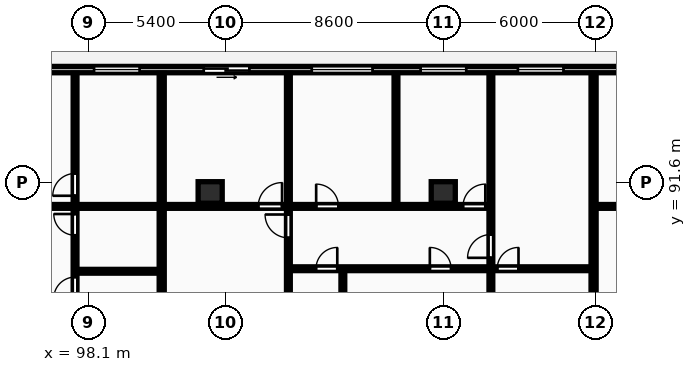
"""IFC4 building model, lengths in metres.
Left out: names, types, materials, properties, quantities, classifications, styles, units other than length and angle.
Written with IfcOpenShell. Run it as: python <this file> out.ifc"""

import sys

from ifc_helpers import new_model, si_unit, direction, frame, frame_2d, origin, origin_2d, place, context, subcontext, project, spatial, rectangle, extrude, element, fill, save


model = new_model("IFC4")
c1 = context("Model", 3, precision=1e-05, world=origin(), true_north=direction((0.0, 1.0)))
c2 = subcontext(c1, "Body", "Model", "MODEL_VIEW")
j1 = project(units=[si_unit("LENGTHUNIT", "METRE"), si_unit("PLANEANGLEUNIT", "RADIAN")], contexts=[c1])
p1 = place(None, origin())
s1 = spatial("IfcSite", under=j1, at=p1, CompositionType="ELEMENT")
p2 = place(p1, origin())
s2 = spatial("IfcBuilding", under=s1, at=p2, CompositionType="ELEMENT")
p3 = place(p2, frame((0.0, 0.0, 87.3)))
s3 = spatial("IfcBuildingStorey", under=s2, at=p3, CompositionType="ELEMENT", Elevation=87.3)
for number, where, z_axis, x_axis in (
    (1, (102.9, 91.2, 0.0), (0.0, 0.0, 1.0), (1.0, 0.0, 0.0)),
    (2, (112.1, 91.2, 0.0), (0.0, 0.0, 1.0), (1.0, 0.0, 0.0)),
):
    element("IfcColumn", number, at=place(p3, frame(where, z_axis=z_axis, x_axis=x_axis)), inside=s3, PredefinedType="COLUMN", context=c2, shape_type="SweptSolid", body=[
        extrude(rectangle(XDim=0.95, YDim=0.85, at=origin_2d()), origin(), (0.0, 0.0, 1.0), 3.25),
    ])
p4 = place(p3, frame((130.6, 96.05, 0.0), z_axis=(0.0, 0.0, 1.0), x_axis=(-1.0, 0.0, 0.0)))
e3 = element("IfcWall", 3, at=p4, inside=s3, PredefinedType="STANDARD", context=c2, shape_type="SweptSolid", body=[
    extrude(rectangle(XDim=73.0, YDim=0.25, at=frame_2d((36.5, 0.0))), origin(), (0.0, 0.0, 1.0), 2.97),
])
p5 = place(p4, frame((67.867, 0.0, 0.0)))
e4 = element("IfcOpeningElement", 4, at=p5, cuts=e3, PredefinedType="OPENING", context=c2, shape_type="SweptSolid", body=[
    extrude(rectangle(XDim=1.8, YDim=2.2, at=frame_2d((0.9, 1.1))), frame((0.0, 0.135, 0.0), z_axis=(0.0, -1.0, 0.0), x_axis=(1.0, 0.0, 0.0)), (0.0, 0.0, 1.0), 0.27),
])
p6 = place(p4, frame((62.103, 0.0, 0.85)))
e5 = element("IfcOpeningElement", 5, at=p6, cuts=e3, PredefinedType="OPENING", context=c2, shape_type="SweptSolid", body=[
    extrude(rectangle(XDim=1.8, YDim=1.8, at=frame_2d((0.9, 0.9))), frame((0.0, 0.135, 0.0), z_axis=(0.0, -1.0, 0.0), x_axis=(1.0, 0.0, 0.0)), (0.0, 0.0, 1.0), 0.27),
])
p7 = place(p4, frame((56.196, 0.0, 0.0)))
e6 = element("IfcOpeningElement", 6, at=p7, cuts=e3, PredefinedType="OPENING", context=c2, shape_type="SweptSolid", body=[
    extrude(rectangle(XDim=1.8, YDim=2.2, at=frame_2d((0.9, 1.1))), frame((0.0, 0.135, 0.0), z_axis=(0.0, -1.0, 0.0), x_axis=(1.0, 0.0, 0.0)), (0.0, 0.0, 1.0), 0.27),
])
p8 = place(p4, frame((46.557, 0.0, 0.85)))
e7 = element("IfcOpeningElement", 7, at=p8, cuts=e3, PredefinedType="OPENING", context=c2, shape_type="SweptSolid", body=[
    extrude(rectangle(XDim=2.4, YDim=1.9, at=frame_2d((1.2, 0.95))), frame((0.0, 0.135, 0.0), z_axis=(0.0, -1.0, 0.0), x_axis=(1.0, 0.0, 0.0)), (0.0, 0.0, 1.0), 0.27),
])
p9 = place(p4, frame((36.714, 0.0, 0.0)))
e8 = element("IfcOpeningElement", 8, at=p9, cuts=e3, PredefinedType="OPENING", context=c2, shape_type="SweptSolid", body=[
    extrude(rectangle(XDim=1.8, YDim=2.2, at=frame_2d((0.9, 1.1))), frame((0.0, 0.135, 0.0), z_axis=(0.0, -1.0, 0.0), x_axis=(1.0, 0.0, 0.0)), (0.0, 0.0, 1.0), 0.27),
])
p10 = place(p4, frame((30.483, 0.0, 0.85)))
e9 = element("IfcOpeningElement", 9, at=p10, cuts=e3, PredefinedType="OPENING", context=c2, shape_type="SweptSolid", body=[
    extrude(rectangle(XDim=1.8, YDim=1.8, at=frame_2d((0.9, 0.9))), frame((0.0, 0.135, 0.0), z_axis=(0.0, -1.0, 0.0), x_axis=(1.0, 0.0, 0.0)), (0.0, 0.0, 1.0), 0.27),
])
p11 = place(p4, frame((21.29, 0.0, 0.85)))
e10 = element("IfcOpeningElement", 10, at=p11, cuts=e3, PredefinedType="OPENING", context=c2, shape_type="SweptSolid", body=[
    extrude(rectangle(XDim=2.4, YDim=1.9, at=frame_2d((1.2, 0.95))), frame((0.0, 0.135, 0.0), z_axis=(0.0, -1.0, 0.0), x_axis=(1.0, 0.0, 0.0)), (0.0, 0.0, 1.0), 0.27),
])
p12 = place(p4, frame((17.593, 0.0, 0.85)))
e11 = element("IfcOpeningElement", 11, at=p12, cuts=e3, PredefinedType="OPENING", context=c2, shape_type="SweptSolid", body=[
    extrude(rectangle(XDim=1.8, YDim=1.8, at=frame_2d((0.9, 0.9))), frame((0.0, 0.135, 0.0), z_axis=(0.0, -1.0, 0.0), x_axis=(1.0, 0.0, 0.0)), (0.0, 0.0, 1.0), 0.27),
])
p13 = place(p4, frame((26.153, 0.0, 0.0)))
e12 = element("IfcOpeningElement", 12, at=p13, cuts=e3, PredefinedType="OPENING", context=c2, shape_type="SweptSolid", body=[
    extrude(rectangle(XDim=1.8, YDim=2.2, at=frame_2d((0.9, 1.1))), frame((0.0, 0.135, 0.0), z_axis=(0.0, -1.0, 0.0), x_axis=(1.0, 0.0, 0.0)), (0.0, 0.0, 1.0), 0.27),
])
p14 = place(p4, frame((13.753, 0.0, 0.85)))
e13 = element("IfcOpeningElement", 13, at=p14, cuts=e3, PredefinedType="OPENING", context=c2, shape_type="SweptSolid", body=[
    extrude(rectangle(XDim=1.8, YDim=1.8, at=frame_2d((0.9, 0.9))), frame((0.0, 0.135, 0.0), z_axis=(0.0, -1.0, 0.0), x_axis=(1.0, 0.0, 0.0)), (0.0, 0.0, 1.0), 0.27),
])
p15 = place(p4, frame((7.363, 0.0, 0.0)))
e14 = element("IfcOpeningElement", 14, at=p15, cuts=e3, PredefinedType="OPENING", context=c2, shape_type="SweptSolid", body=[
    extrude(rectangle(XDim=1.8, YDim=2.2, at=frame_2d((0.9, 1.1))), frame((0.0, 0.135, 0.0), z_axis=(0.0, -1.0, 0.0), x_axis=(1.0, 0.0, 0.0)), (0.0, 0.0, 1.0), 0.27),
])
p16 = place(p4, frame((0.9, 0.0, 0.85)))
e15 = element("IfcOpeningElement", 15, at=p16, cuts=e3, PredefinedType="OPENING", context=c2, shape_type="SweptSolid", body=[
    extrude(rectangle(XDim=2.4, YDim=1.9, at=frame_2d((1.2, 0.95))), frame((0.0, 0.135, 0.0), z_axis=(0.0, -1.0, 0.0), x_axis=(1.0, 0.0, 0.0)), (0.0, 0.0, 1.0), 0.27),
])
p17 = place(p3, frame((100.987, 69.43, 0.0), z_axis=(0.0, 0.0, 1.0), x_axis=(0.0, 1.0, 0.0)))
e16 = element("IfcWall", 16, at=p17, inside=s3, PredefinedType="PARTITIONING", context=c2, shape_type="SweptSolid", body=[
    extrude(rectangle(XDim=26.47, YDim=0.2, at=frame_2d((13.235, 0.0))), origin(), (0.0, 0.0, 1.0), 2.97),
])
p18 = place(p3, frame((97.627, 88.09, 0.0), z_axis=(0.0, 0.0, 1.0), x_axis=(1.0, 0.0, 0.0)))
e17 = element("IfcWall", 17, at=p18, inside=s3, PredefinedType="PARTITIONING", context=c2, shape_type="SweptSolid", body=[
    extrude(rectangle(XDim=3.28, YDim=0.15, at=frame_2d((1.64, 0.0))), origin(), (0.0, 0.0, 1.0), 2.97),
])
p19 = place(p3, frame((97.567, 85.59, 0.0), z_axis=(0.0, 0.0, 1.0), x_axis=(0.0, 1.0, 0.0)))
e18 = element("IfcWall", 18, at=p19, inside=s3, PredefinedType="PARTITIONING", context=c2, shape_type="SweptSolid", body=[
    extrude(rectangle(XDim=10.31, YDim=0.15, at=frame_2d((5.155, 0.0))), origin(), (0.0, 0.0, 1.0), 2.97),
])
p20 = place(p19, frame((1.43, 0.0, 0.0)))
e19 = element("IfcOpeningElement", 19, at=p20, cuts=e18, PredefinedType="OPENING", context=c2, shape_type="SweptSolid", body=[
    extrude(rectangle(XDim=0.84, YDim=2.04, at=frame_2d((0.42, 1.02))), frame((0.0, 0.085, 0.0), z_axis=(0.0, -1.0, 0.0), x_axis=(1.0, 0.0, 0.0)), (0.0, 0.0, 1.0), 0.17),
])
p21 = place(p19, frame((3.92, 0.0, 0.0)))
e20 = element("IfcOpeningElement", 20, at=p21, cuts=e18, PredefinedType="OPENING", context=c2, shape_type="SweptSolid", body=[
    extrude(rectangle(XDim=0.84, YDim=2.04, at=frame_2d((0.42, 1.02))), frame((0.0, 0.085, 0.0), z_axis=(0.0, -1.0, 0.0), x_axis=(1.0, 0.0, 0.0)), (0.0, 0.0, 1.0), 0.17),
])
p22 = place(p19, frame((5.48, 0.0, 0.0)))
e21 = element("IfcOpeningElement", 21, at=p22, cuts=e18, PredefinedType="OPENING", context=c2, shape_type="SweptSolid", body=[
    extrude(rectangle(XDim=0.88, YDim=2.06, at=frame_2d((0.44, 1.03))), frame((0.0, 0.085, 0.0), z_axis=(0.0, -1.0, 0.0), x_axis=(1.0, 0.0, 0.0)), (0.0, 0.0, 1.0), 0.17),
])
p23 = place(p3, frame((88.365, 90.65, 0.0), z_axis=(0.0, 0.0, 1.0), x_axis=(1.0, 0.0, 0.0)))
e22 = element("IfcWall", 22, at=p23, inside=s3, PredefinedType="PARTITIONING", context=c2, shape_type="SweptSolid", body=[
    extrude(rectangle(XDim=12.543, YDim=0.15, at=frame_2d((6.271, 0.0))), origin(), (0.0, 0.0, 1.0), 2.97),
])
p24 = place(p23, frame((7.081, 0.0, 0.0)))
e23 = element("IfcOpeningElement", 23, at=p24, cuts=e22, PredefinedType="OPENING", context=c2, shape_type="SweptSolid", body=[
    extrude(rectangle(XDim=0.94, YDim=2.1, at=frame_2d((0.47, 1.05))), frame((0.0, 0.085, 0.0), z_axis=(0.0, -1.0, 0.0), x_axis=(1.0, 0.0, 0.0)), (0.0, 0.0, 1.0), 0.17),
])
p25 = place(p3, frame((118.033, 69.43, 0.0), z_axis=(0.0, 0.0, 1.0), x_axis=(0.0, 1.0, 0.0)))
e24 = element("IfcWall", 24, at=p25, inside=s3, PredefinedType="PARTITIONING", context=c2, shape_type="SweptSolid", body=[
    extrude(rectangle(XDim=26.47, YDim=0.2, at=frame_2d((13.235, 0.0))), origin(), (0.0, 0.0, 1.0), 2.97),
])
p26 = place(p3, frame((108.137, 85.59, 0.0), z_axis=(0.0, 0.0, 1.0), x_axis=(0.0, 1.0, 0.0)))
e25 = element("IfcWall", 25, at=p26, inside=s3, PredefinedType="PARTITIONING", context=c2, shape_type="SweptSolid", body=[
    extrude(rectangle(XDim=2.58, YDim=0.15, at=frame_2d((1.29, 0.0))), origin(), (0.0, 0.0, 1.0), 2.97),
])
p27 = place(p3, frame((110.234, 90.73, 0.0), z_axis=(0.0, 0.0, 1.0), x_axis=(0.0, 1.0, 0.0)))
e26 = element("IfcWall", 26, at=p27, inside=s3, PredefinedType="PARTITIONING", context=c2, shape_type="SweptSolid", body=[
    extrude(rectangle(XDim=5.17, YDim=0.15, at=frame_2d((2.585, 0.0))), origin(), (0.0, 0.0, 1.0), 2.97),
])
p28 = place(p3, frame((105.987, 85.59, 0.0), z_axis=(0.0, 0.0, 1.0), x_axis=(0.0, 1.0, 0.0)))
e27 = element("IfcWall", 27, at=p28, inside=s3, PredefinedType="PARTITIONING", context=c2, shape_type="SweptSolid", body=[
    extrude(rectangle(XDim=10.31, YDim=0.15, at=frame_2d((5.155, 0.0))), origin(), (0.0, 0.0, 1.0), 2.97),
])
p29 = place(p28, frame((3.82, 0.0, 0.0)))
e28 = element("IfcOpeningElement", 28, at=p29, cuts=e27, PredefinedType="OPENING", context=c2, shape_type="SweptSolid", body=[
    extrude(rectangle(XDim=0.92, YDim=2.08, at=frame_2d((0.46, 1.04))), frame((0.0, 0.085, 0.0), z_axis=(0.0, -1.0, 0.0), x_axis=(1.0, 0.0, 0.0)), (0.0, 0.0, 1.0), 0.17),
])
p30 = place(p3, frame((113.98, 85.59, 0.0), z_axis=(0.0, 0.0, 1.0), x_axis=(0.0, 1.0, 0.0)))
e29 = element("IfcWall", 29, at=p30, inside=s3, PredefinedType="PARTITIONING", context=c2, shape_type="SweptSolid", body=[
    extrude(rectangle(XDim=2.58, YDim=0.15, at=frame_2d((1.29, 0.0))), origin(), (0.0, 0.0, 1.0), 2.97),
])
p31 = place(p3, frame((113.98, 88.21, 0.0), z_axis=(0.0, 0.0, 1.0), x_axis=(0.0, 1.0, 0.0)))
e30 = element("IfcWall", 30, at=p31, inside=s3, PredefinedType="PARTITIONING", context=c2, shape_type="SweptSolid", body=[
    extrude(rectangle(XDim=7.69, YDim=0.15, at=frame_2d((3.845, 0.0))), origin(), (0.0, 0.0, 1.0), 2.97),
])
p32 = place(p31, frame((0.41, 0.0, 0.0)))
e31 = element("IfcOpeningElement", 31, at=p32, cuts=e30, PredefinedType="OPENING", context=c2, shape_type="SweptSolid", body=[
    extrude(rectangle(XDim=0.92, YDim=2.08, at=frame_2d((0.46, 1.04))), frame((0.0, 0.085, 0.0), z_axis=(0.0, -1.0, 0.0), x_axis=(1.0, 0.0, 0.0)), (0.0, 0.0, 1.0), 0.17),
])
p33 = place(p3, frame((106.027, 88.19, 0.0), z_axis=(0.0, 0.0, 1.0), x_axis=(1.0, 0.0, 0.0)))
e32 = element("IfcWall", 32, at=p33, inside=s3, PredefinedType="PARTITIONING", context=c2, shape_type="SweptSolid", body=[
    extrude(rectangle(XDim=11.926, YDim=0.15, at=frame_2d((5.963, 0.0))), origin(), (0.0, 0.0, 1.0), 2.97),
])
p34 = place(p33, frame((1.05, 0.0, 0.0)))
e33 = element("IfcOpeningElement", 33, at=p34, cuts=e32, PredefinedType="OPENING", context=c2, shape_type="SweptSolid", body=[
    extrude(rectangle(XDim=0.84, YDim=2.04, at=frame_2d((0.42, 1.02))), frame((0.0, 0.085, 0.0), z_axis=(0.0, -1.0, 0.0), x_axis=(1.0, 0.0, 0.0)), (0.0, 0.0, 1.0), 0.17),
])
p35 = place(p33, frame((5.543, 0.0, 0.0)))
e34 = element("IfcOpeningElement", 34, at=p35, cuts=e32, PredefinedType="OPENING", context=c2, shape_type="SweptSolid", body=[
    extrude(rectangle(XDim=0.84, YDim=2.04, at=frame_2d((0.42, 1.02))), frame((0.0, 0.085, 0.0), z_axis=(0.0, -1.0, 0.0), x_axis=(1.0, 0.0, 0.0)), (0.0, 0.0, 1.0), 0.17),
])
p36 = place(p33, frame((8.203, 0.0, 0.0)))
e35 = element("IfcOpeningElement", 35, at=p36, cuts=e32, PredefinedType="OPENING", context=c2, shape_type="SweptSolid", body=[
    extrude(rectangle(XDim=0.84, YDim=2.04, at=frame_2d((0.42, 1.02))), frame((0.0, 0.085, 0.0), z_axis=(0.0, -1.0, 0.0), x_axis=(1.0, 0.0, 0.0)), (0.0, 0.0, 1.0), 0.17),
])
p37 = place(p3, frame((101.067, 90.65, 0.0), z_axis=(0.0, 0.0, 1.0), x_axis=(1.0, 0.0, 0.0)))
e36 = element("IfcWall", 36, at=p37, inside=s3, PredefinedType="PARTITIONING", context=c2, shape_type="SweptSolid", body=[
    extrude(rectangle(XDim=12.913, YDim=0.15, at=frame_2d((6.457, 0.0))), origin(), (0.0, 0.0, 1.0), 2.97),
])
p38 = place(p37, frame((3.73, 0.0, 0.0)))
e37 = element("IfcOpeningElement", 37, at=p38, cuts=e36, PredefinedType="OPENING", context=c2, shape_type="SweptSolid", body=[
    extrude(rectangle(XDim=0.94, YDim=2.1, at=frame_2d((0.47, 1.05))), frame((0.0, 0.085, 0.0), z_axis=(0.0, -1.0, 0.0), x_axis=(1.0, 0.0, 0.0)), (0.0, 0.0, 1.0), 0.17),
])
p39 = place(p37, frame((6.016, 0.0, 0.0)))
e38 = element("IfcOpeningElement", 38, at=p39, cuts=e36, PredefinedType="OPENING", context=c2, shape_type="SweptSolid", body=[
    extrude(rectangle(XDim=0.88, YDim=2.06, at=frame_2d((0.44, 1.03))), frame((0.0, 0.085, 0.0), z_axis=(0.0, -1.0, 0.0), x_axis=(1.0, 0.0, 0.0)), (0.0, 0.0, 1.0), 0.17),
])
p40 = place(p37, frame((11.813, 0.0, 0.0)))
e39 = element("IfcOpeningElement", 39, at=p40, cuts=e36, PredefinedType="OPENING", context=c2, shape_type="SweptSolid", body=[
    extrude(rectangle(XDim=0.88, YDim=2.06, at=frame_2d((0.44, 1.03))), frame((0.0, 0.085, 0.0), z_axis=(0.0, -1.0, 0.0), x_axis=(1.0, 0.0, 0.0)), (0.0, 0.0, 1.0), 0.17),
])
p41 = place(p3, frame((118.113, 90.65, 0.0), z_axis=(0.0, 0.0, 1.0), x_axis=(1.0, 0.0, 0.0)))
e40 = element("IfcWall", 40, at=p41, inside=s3, PredefinedType="PARTITIONING", context=c2, shape_type="SweptSolid", body=[
    extrude(rectangle(XDim=12.407, YDim=0.15, at=frame_2d((6.203, 0.0))), origin(), (0.0, 0.0, 1.0), 2.97),
])
p42 = place(p41, frame((5.733, 0.0, 0.0)))
e41 = element("IfcOpeningElement", 41, at=p42, cuts=e40, PredefinedType="OPENING", context=c2, shape_type="SweptSolid", body=[
    extrude(rectangle(XDim=0.94, YDim=2.1, at=frame_2d((0.47, 1.05))), frame((0.0, 0.085, 0.0), z_axis=(0.0, -1.0, 0.0), x_axis=(1.0, 0.0, 0.0)), (0.0, 0.0, 1.0), 0.17),
])
p43 = place(p10, origin())
e42 = element("IfcWindow", 42, at=p43, inside=s3, PartitioningType="SINGLE_PANEL", PredefinedType="WINDOW", context=c2, shape_type="SweptSolid", body=[
    extrude(rectangle(XDim=1.8, YDim=1.8, at=frame_2d((0.9, 0.9))), frame((0.0, 0.03, 0.0), z_axis=(0.0, -1.0, 0.0), x_axis=(1.0, 0.0, 0.0)), (0.0, 0.0, 1.0), 0.06),
])
fill(e9, e42)
p44 = place(p11, origin())
e43 = element("IfcWindow", 43, at=p44, inside=s3, PartitioningType="DOUBLE_PANEL_VERTICAL", PredefinedType="WINDOW", context=c2, shape_type="SweptSolid", body=[
    extrude(rectangle(XDim=2.4, YDim=1.9, at=frame_2d((1.2, 0.95))), frame((0.0, 0.03, 0.0), z_axis=(0.0, -1.0, 0.0), x_axis=(1.0, 0.0, 0.0)), (0.0, 0.0, 1.0), 0.06),
])
fill(e10, e43)
p45 = place(p12, origin())
e44 = element("IfcWindow", 44, at=p45, inside=s3, PartitioningType="SINGLE_PANEL", PredefinedType="WINDOW", context=c2, shape_type="SweptSolid", body=[
    extrude(rectangle(XDim=1.8, YDim=1.8, at=frame_2d((0.9, 0.9))), frame((0.0, 0.03, 0.0), z_axis=(0.0, -1.0, 0.0), x_axis=(1.0, 0.0, 0.0)), (0.0, 0.0, 1.0), 0.06),
])
fill(e11, e44)
p46 = place(p13, origin())
e45 = element("IfcDoor", 45, at=p46, inside=s3, OperationType="SLIDING_TO_LEFT", PredefinedType="DOOR", context=c2, shape_type="SweptSolid", body=[
    extrude(rectangle(XDim=1.8, YDim=2.2, at=frame_2d((0.9, 1.1))), frame((0.0, 0.025, 0.0), z_axis=(0.0, -1.0, 0.0), x_axis=(1.0, 0.0, 0.0)), (0.0, 0.0, 1.0), 0.05),
])
fill(e12, e45)
p47 = place(p14, origin())
e46 = element("IfcWindow", 46, at=p47, inside=s3, PartitioningType="SINGLE_PANEL", PredefinedType="WINDOW", context=c2, shape_type="SweptSolid", body=[
    extrude(rectangle(XDim=1.8, YDim=1.8, at=frame_2d((0.9, 0.9))), frame((0.0, 0.03, 0.0), z_axis=(0.0, -1.0, 0.0), x_axis=(1.0, 0.0, 0.0)), (0.0, 0.0, 1.0), 0.06),
])
fill(e13, e46)
p48 = place(p20, origin())
e47 = element("IfcDoor", 47, at=p48, inside=s3, OperationType="SINGLE_SWING_LEFT", PredefinedType="DOOR", context=c2, shape_type="SweptSolid", body=[
    extrude(rectangle(XDim=0.84, YDim=2.04, at=frame_2d((0.42, 1.02))), frame((0.0, 0.025, 0.0), z_axis=(0.0, -1.0, 0.0), x_axis=(1.0, 0.0, 0.0)), (0.0, 0.0, 1.0), 0.05),
])
fill(e19, e47)
p49 = place(p21, origin())
e48 = element("IfcDoor", 48, at=p49, inside=s3, OperationType="SINGLE_SWING_RIGHT", PredefinedType="DOOR", context=c2, shape_type="SweptSolid", body=[
    extrude(rectangle(XDim=0.84, YDim=2.04, at=frame_2d((0.42, 1.02))), frame((0.0, 0.025, 0.0), z_axis=(0.0, -1.0, 0.0), x_axis=(1.0, 0.0, 0.0)), (0.0, 0.0, 1.0), 0.05),
])
fill(e20, e48)
p50 = place(p22, origin())
e49 = element("IfcDoor", 49, at=p50, inside=s3, OperationType="SINGLE_SWING_LEFT", PredefinedType="DOOR", context=c2, shape_type="SweptSolid", body=[
    extrude(rectangle(XDim=0.88, YDim=2.06, at=frame_2d((0.44, 1.03))), frame((0.0, 0.025, 0.0), z_axis=(0.0, -1.0, 0.0), x_axis=(1.0, 0.0, 0.0)), (0.0, 0.0, 1.0), 0.05),
])
fill(e21, e49)
p51 = place(p29, origin())
e50 = element("IfcDoor", 50, at=p51, inside=s3, OperationType="SINGLE_SWING_RIGHT", PredefinedType="DOOR", context=c2, shape_type="SweptSolid", body=[
    extrude(rectangle(XDim=0.92, YDim=2.08, at=frame_2d((0.46, 1.04))), frame((0.0, 0.025, 0.0), z_axis=(0.0, -1.0, 0.0), x_axis=(1.0, 0.0, 0.0)), (0.0, 0.0, 1.0), 0.05),
])
fill(e28, e50)
p52 = place(p32, origin())
e51 = element("IfcDoor", 51, at=p52, inside=s3, OperationType="SINGLE_SWING_LEFT", PredefinedType="DOOR", context=c2, shape_type="SweptSolid", body=[
    extrude(rectangle(XDim=0.92, YDim=2.08, at=frame_2d((0.46, 1.04))), frame((0.0, 0.025, 0.0), z_axis=(0.0, -1.0, 0.0), x_axis=(1.0, 0.0, 0.0)), (0.0, 0.0, 1.0), 0.05),
])
fill(e31, e51)
p53 = place(p34, origin())
e52 = element("IfcDoor", 52, at=p53, inside=s3, OperationType="SINGLE_SWING_RIGHT", PredefinedType="DOOR", context=c2, shape_type="SweptSolid", body=[
    extrude(rectangle(XDim=0.84, YDim=2.04, at=frame_2d((0.42, 1.02))), frame((0.0, 0.025, 0.0), z_axis=(0.0, -1.0, 0.0), x_axis=(1.0, 0.0, 0.0)), (0.0, 0.0, 1.0), 0.05),
])
fill(e33, e52)
p54 = place(p35, origin())
e53 = element("IfcDoor", 53, at=p54, inside=s3, OperationType="SINGLE_SWING_LEFT", PredefinedType="DOOR", context=c2, shape_type="SweptSolid", body=[
    extrude(rectangle(XDim=0.84, YDim=2.04, at=frame_2d((0.42, 1.02))), frame((0.0, 0.025, 0.0), z_axis=(0.0, -1.0, 0.0), x_axis=(1.0, 0.0, 0.0)), (0.0, 0.0, 1.0), 0.05),
])
fill(e34, e53)
p55 = place(p36, origin())
e54 = element("IfcDoor", 54, at=p55, inside=s3, OperationType="SINGLE_SWING_RIGHT", PredefinedType="DOOR", context=c2, shape_type="SweptSolid", body=[
    extrude(rectangle(XDim=0.84, YDim=2.04, at=frame_2d((0.42, 1.02))), frame((0.0, 0.025, 0.0), z_axis=(0.0, -1.0, 0.0), x_axis=(1.0, 0.0, 0.0)), (0.0, 0.0, 1.0), 0.05),
])
fill(e35, e54)
p56 = place(p38, origin())
e55 = element("IfcDoor", 55, at=p56, inside=s3, OperationType="SINGLE_SWING_RIGHT", PredefinedType="DOOR", context=c2, shape_type="SweptSolid", body=[
    extrude(rectangle(XDim=0.94, YDim=2.1, at=frame_2d((0.47, 1.05))), frame((0.0, 0.025, 0.0), z_axis=(0.0, -1.0, 0.0), x_axis=(1.0, 0.0, 0.0)), (0.0, 0.0, 1.0), 0.05),
])
fill(e37, e55)
p57 = place(p39, origin())
e56 = element("IfcDoor", 56, at=p57, inside=s3, OperationType="SINGLE_SWING_LEFT", PredefinedType="DOOR", context=c2, shape_type="SweptSolid", body=[
    extrude(rectangle(XDim=0.88, YDim=2.06, at=frame_2d((0.44, 1.03))), frame((0.0, 0.025, 0.0), z_axis=(0.0, -1.0, 0.0), x_axis=(1.0, 0.0, 0.0)), (0.0, 0.0, 1.0), 0.05),
])
fill(e38, e56)
p58 = place(p40, origin())
e57 = element("IfcDoor", 57, at=p58, inside=s3, OperationType="SINGLE_SWING_RIGHT", PredefinedType="DOOR", context=c2, shape_type="SweptSolid", body=[
    extrude(rectangle(XDim=0.88, YDim=2.06, at=frame_2d((0.44, 1.03))), frame((0.0, 0.025, 0.0), z_axis=(0.0, -1.0, 0.0), x_axis=(1.0, 0.0, 0.0)), (0.0, 0.0, 1.0), 0.05),
])
fill(e39, e57)
save(model, sys.argv[1])
